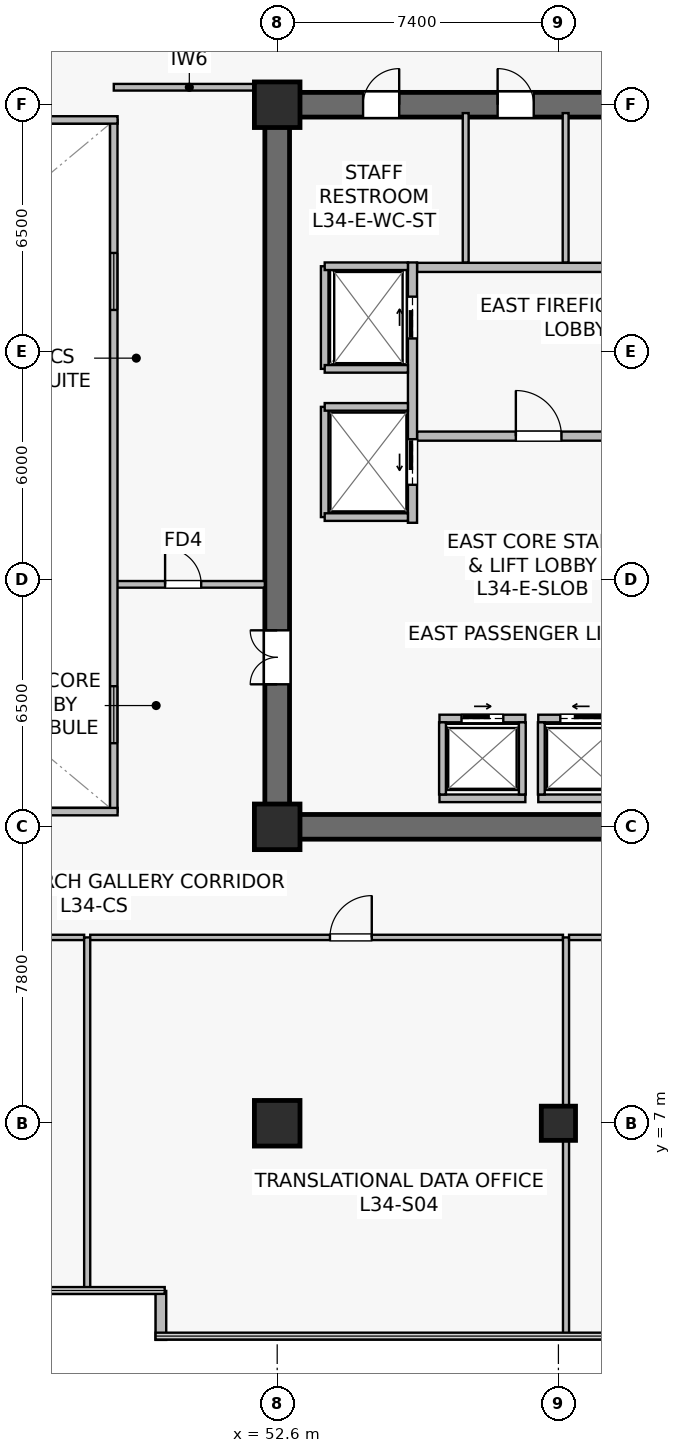
"""IFC4 building model, lengths in metres.
Left out: names, types, materials, properties, quantities, classifications, styles, units other than length and angle.
Written with IfcOpenShell. Run it as: python <this file> out.ifc"""

import sys

from ifc_helpers import new_model, si_unit, direction, frame, frame_2d, origin, origin_2d, place, context, subcontext, project, spatial, rectangle, extrude, source, transform, mapped, element, fill, save


model = new_model("IFC4")
c1 = context("Model", 3, precision=1e-05, world=origin(), true_north=direction((0.0, 1.0)))
c2 = subcontext(c1, "Body", "Model", "MODEL_VIEW")
j1 = project(units=[si_unit("LENGTHUNIT", "METRE"), si_unit("PLANEANGLEUNIT", "RADIAN")], contexts=[c1])
p1 = place(None, origin())
s1 = spatial("IfcSite", under=j1, at=p1, CompositionType="ELEMENT")
p2 = place(p1, origin())
s2 = spatial("IfcBuilding", under=s1, at=p2, CompositionType="ELEMENT")
p3 = place(p2, frame((0.0, 0.0, 142.0)))
s3 = spatial("IfcBuildingStorey", under=s2, at=p3, CompositionType="ELEMENT", Elevation=142.0)
p4 = place(p3, frame((52.275, 14.8, 0.0), z_axis=(0.0, 0.0, 1.0), x_axis=(1.0, 0.0, 0.0)))
e1 = element("IfcWall", 1, at=p4, inside=s3, PredefinedType="SHEAR", context=c2, shape_type="SweptSolid", body=[
    extrude(rectangle(XDim=15.45, YDim=0.65, at=frame_2d((7.725, 0.0))), origin(), (0.0, 0.0, 1.0), 3.79),
])
p5 = place(p3, frame((52.275, 33.8, 0.0), z_axis=(0.0, 0.0, 1.0), x_axis=(1.0, 0.0, 0.0)))
e2 = element("IfcWall", 2, at=p5, inside=s3, PredefinedType="SHEAR", context=c2, shape_type="SweptSolid", body=[
    extrude(rectangle(XDim=15.45, YDim=0.65, at=frame_2d((7.725, 0.0))), origin(), (0.0, 0.0, 1.0), 3.79),
])
p6 = place(p5, frame((6.125, 0.0, 0.0)))
e3 = element("IfcOpeningElement", 3, at=p6, cuts=e2, PredefinedType="OPENING", context=c2, shape_type="SweptSolid", body=[
    extrude(rectangle(XDim=0.95, YDim=2.15, at=frame_2d((0.475, 1.075))), frame((0.0, 0.335, 0.0), z_axis=(0.0, -1.0, 0.0), x_axis=(1.0, 0.0, 0.0)), (0.0, 0.0, 1.0), 0.67),
])
p7 = place(p5, frame((2.585, 0.0, 0.0)))
e4 = element("IfcOpeningElement", 4, at=p7, cuts=e2, PredefinedType="OPENING", context=c2, shape_type="SweptSolid", body=[
    extrude(rectangle(XDim=0.95, YDim=2.15, at=frame_2d((0.475, 1.075))), frame((0.0, 0.335, 0.0), z_axis=(0.0, -1.0, 0.0), x_axis=(1.0, 0.0, 0.0)), (0.0, 0.0, 1.0), 0.67),
])
p8 = place(p3, frame((52.6, 15.125, 0.0), z_axis=(0.0, 0.0, 1.0), x_axis=(0.0, 1.0, 0.0)))
e5 = element("IfcWall", 5, at=p8, inside=s3, PredefinedType="SHEAR", context=c2, shape_type="SweptSolid", body=[
    extrude(rectangle(XDim=18.35, YDim=0.65, at=frame_2d((9.175, 0.0))), origin(), (0.0, 0.0, 1.0), 3.79),
])
p9 = place(p8, frame((3.425, 0.0, 0.0)))
e6 = element("IfcOpeningElement", 6, at=p9, cuts=e5, PredefinedType="OPENING", context=c2, shape_type="SweptSolid", body=[
    extrude(rectangle(XDim=1.42, YDim=2.2, at=frame_2d((0.71, 1.1))), frame((0.0, 0.335, 0.0), z_axis=(0.0, -1.0, 0.0), x_axis=(1.0, 0.0, 0.0)), (0.0, 0.0, 1.0), 0.67),
])
m1 = source(origin(), c2, "Body", "SweptSolid", [
    extrude(rectangle(XDim=1.2, YDim=1.2, at=origin_2d()), origin(), (0.0, 0.0, 1.0), 4.1),
])
p10 = place(p3, frame((52.6, 7.0, 0.0), z_axis=(0.0, 0.0, 1.0), x_axis=(1.0, 0.0, 0.0)))
e7 = element("IfcColumn", 7, at=p10, inside=s3, PredefinedType="COLUMN", context=c2, shape_type="MappedRepresentation", body=[
    mapped(m1, transform((0.0, 0.0, 0.0), scale=1.0)),
])
m2 = source(origin(), c2, "Body", "SweptSolid", [
    extrude(rectangle(XDim=0.9, YDim=0.9, at=origin_2d()), origin(), (0.0, 0.0, 1.0), 4.1),
])
p11 = place(p3, frame((60.0, 7.0, 0.0), z_axis=(0.0, 0.0, 1.0), x_axis=(1.0, 0.0, 0.0)))
e8 = element("IfcColumn", 8, at=p11, inside=s3, PredefinedType="COLUMN", context=c2, shape_type="MappedRepresentation", body=[
    mapped(m2, transform((0.0, 0.0, 0.0), scale=1.0)),
])
for number, where, z_axis, x_axis in (
    (9, (52.6, 14.8, 0.0), (0.0, 0.0, 1.0), (1.0, 0.0, 0.0)),
    (10, (52.6, 33.8, 0.0), (0.0, 0.0, 1.0), (1.0, 0.0, 0.0)),
):
    element("IfcColumn", number, at=place(p3, frame(where, z_axis=z_axis, x_axis=x_axis)), inside=s3, PredefinedType="COLUMN", context=c2, shape_type="MappedRepresentation", body=[
        mapped(m1, transform((0.0, 0.0, 0.0), scale=1.0)),
    ])
p12 = place(p3, frame((49.54, 2.588, 0.0), z_axis=(0.0, 0.0, 1.0), x_axis=(0.0, -1.0, 0.0)))
e11 = element("IfcWall", 11, at=p12, inside=s3, PredefinedType="STANDARD", context=c2, shape_type="SweptSolid", body=[
    extrude(rectangle(XDim=1.288, YDim=0.28, at=frame_2d((0.644, 0.0))), origin(), (0.0, 0.0, 1.0), 3.79),
])
p13 = place(p3, frame((56.28, 25.08, 0.0), z_axis=(0.0, 0.0, 1.0), x_axis=(1.0, 0.0, 0.0)))
e12 = element("IfcWall", 12, at=p13, inside=s3, PredefinedType="SOLIDWALL", context=c2, shape_type="SweptSolid", body=[
    extrude(rectangle(XDim=6.92, YDim=0.24, at=frame_2d((3.46, 0.0))), origin(), (0.0, 0.0, 1.0), 3.125),
])
p14 = place(p13, frame((2.6, 0.0, 0.0)))
e13 = element("IfcOpeningElement", 13, at=p14, cuts=e12, PredefinedType="OPENING", context=c2, shape_type="SweptSolid", body=[
    extrude(rectangle(XDim=1.2, YDim=2.16, at=frame_2d((0.6, 1.08))), frame((0.0, 0.13, 0.0), z_axis=(0.0, -1.0, 0.0), x_axis=(1.0, 0.0, 0.0)), (0.0, 0.0, 1.0), 0.26),
])
p15 = place(p3, frame((56.28, 29.52, 0.0), z_axis=(0.0, 0.0, 1.0), x_axis=(1.0, 0.0, 0.0)))
e14 = element("IfcWall", 14, at=p15, inside=s3, PredefinedType="SOLIDWALL", context=c2, shape_type="SweptSolid", body=[
    extrude(rectangle(XDim=6.92, YDim=0.24, at=frame_2d((3.46, 0.0))), origin(), (0.0, 0.0, 1.0), 3.125),
])
p16 = place(p3, frame((56.16, 22.8, 0.0), z_axis=(0.0, 0.0, 1.0), x_axis=(0.0, 1.0, 0.0)))
e15 = element("IfcWall", 15, at=p16, inside=s3, PredefinedType="SOLIDWALL", context=c2, shape_type="SweptSolid", body=[
    extrude(rectangle(XDim=6.85, YDim=0.24, at=frame_2d((3.425, 0.0))), origin(), (0.0, 0.0, 1.0), 2.875),
])
p17 = place(p16, frame((4.85, 0.0, 0.0)))
e16 = element("IfcOpeningElement", 16, at=p17, cuts=e15, PredefinedType="OPENING", context=c2, shape_type="SweptSolid", body=[
    extrude(rectangle(XDim=1.1, YDim=2.22, at=frame_2d((0.55, 1.11))), frame((0.0, 0.13, 0.0), z_axis=(0.0, -1.0, 0.0), x_axis=(1.0, 0.0, 0.0)), (0.0, 0.0, 1.0), 0.26),
])
p18 = place(p16, frame((1.0, 0.0, 0.0)))
e17 = element("IfcOpeningElement", 17, at=p18, cuts=e15, PredefinedType="OPENING", context=c2, shape_type="SweptSolid", body=[
    extrude(rectangle(XDim=1.2, YDim=2.22, at=frame_2d((0.6, 1.11))), frame((0.0, 0.13, 0.0), z_axis=(0.0, -1.0, 0.0), x_axis=(1.0, 0.0, 0.0)), (0.0, 0.0, 1.0), 0.26),
])
p19 = place(p3, frame((59.47, 17.65, 0.0), z_axis=(0.0, 0.0, 1.0), x_axis=(1.0, 0.0, 0.0)))
e18 = element("IfcWall", 18, at=p19, inside=s3, PredefinedType="SOLIDWALL", context=c2, shape_type="SweptSolid", body=[
    extrude(rectangle(XDim=2.26, YDim=0.2, at=frame_2d((1.13, 0.0))), origin(), (0.0, 0.0, 1.0), 3.125),
])
p20 = place(p19, frame((0.58, 0.0, 0.0)))
e19 = element("IfcOpeningElement", 19, at=p20, cuts=e18, PredefinedType="OPENING", context=c2, shape_type="SweptSolid", body=[
    extrude(rectangle(XDim=1.1, YDim=2.22, at=frame_2d((0.55, 1.11))), frame((0.0, 0.11, 0.0), z_axis=(0.0, -1.0, 0.0), x_axis=(1.0, 0.0, 0.0)), (0.0, 0.0, 1.0), 0.22),
])
p21 = place(p3, frame((59.47, 15.55, 0.0), z_axis=(0.0, 0.0, 1.0), x_axis=(1.0, 0.0, 0.0)))
e20 = element("IfcWall", 20, at=p21, inside=s3, PredefinedType="SOLIDWALL", context=c2, shape_type="SweptSolid", body=[
    extrude(rectangle(XDim=2.26, YDim=0.2, at=frame_2d((1.13, 0.0))), origin(), (0.0, 0.0, 1.0), 3.125),
])
p22 = place(p3, frame((59.55, 15.65, 0.0), z_axis=(0.0, 0.0, 1.0), x_axis=(0.0, 1.0, 0.0)))
e21 = element("IfcWall", 21, at=p22, inside=s3, PredefinedType="SOLIDWALL", context=c2, shape_type="SweptSolid", body=[
    extrude(rectangle(XDim=1.9, YDim=0.18, at=frame_2d((0.95, 0.0))), origin(), (0.0, 0.0, 1.0), 3.79),
])
p23 = place(p3, frame((56.87, 17.65, 0.0), z_axis=(0.0, 0.0, 1.0), x_axis=(1.0, 0.0, 0.0)))
e22 = element("IfcWall", 22, at=p23, inside=s3, PredefinedType="SOLIDWALL", context=c2, shape_type="SweptSolid", body=[
    extrude(rectangle(XDim=2.26, YDim=0.2, at=frame_2d((1.13, 0.0))), origin(), (0.0, 0.0, 1.0), 3.79),
])
p24 = place(p23, frame((0.58, 0.0, 0.0)))
e23 = element("IfcOpeningElement", 23, at=p24, cuts=e22, PredefinedType="OPENING", context=c2, shape_type="SweptSolid", body=[
    extrude(rectangle(XDim=1.1, YDim=2.22, at=frame_2d((0.55, 1.11))), frame((0.0, 0.11, 0.0), z_axis=(0.0, -1.0, 0.0), x_axis=(1.0, 0.0, 0.0)), (0.0, 0.0, 1.0), 0.22),
])
p25 = place(p3, frame((56.87, 15.55, 0.0), z_axis=(0.0, 0.0, 1.0), x_axis=(1.0, 0.0, 0.0)))
e24 = element("IfcWall", 24, at=p25, inside=s3, PredefinedType="SOLIDWALL", context=c2, shape_type="SweptSolid", body=[
    extrude(rectangle(XDim=2.26, YDim=0.2, at=frame_2d((1.13, 0.0))), origin(), (0.0, 0.0, 1.0), 3.79),
])
for number, where, z_axis, x_axis in (
    (25, (56.95, 15.65, 0.0), (0.0, 0.0, 1.0), (0.0, 1.0, 0.0)),
    (26, (59.05, 15.65, 0.0), (0.0, 0.0, 1.0), (0.0, 1.0, 0.0)),
):
    element("IfcWall", number, at=place(p3, frame(where, z_axis=z_axis, x_axis=x_axis)), inside=s3, PredefinedType="SOLIDWALL", context=c2, shape_type="SweptSolid", body=[
        extrude(rectangle(XDim=1.9, YDim=0.18, at=frame_2d((0.95, 0.0))), origin(), (0.0, 0.0, 1.0), 3.79),
    ])
p26 = place(p3, frame((53.85, 26.85, 0.0), z_axis=(0.0, 0.0, 1.0), x_axis=(0.0, 1.0, 0.0)))
e27 = element("IfcWall", 27, at=p26, inside=s3, PredefinedType="SOLIDWALL", context=c2, shape_type="SweptSolid", body=[
    extrude(rectangle(XDim=2.7, YDim=0.2, at=frame_2d((1.35, 0.0))), origin(), (0.0, 0.0, 1.0), 3.79),
])
p27 = place(p3, frame((53.85, 29.55, 0.0), z_axis=(0.0, 0.0, 1.0), x_axis=(1.0, 0.0, 0.0)))
e28 = element("IfcWall", 28, at=p27, inside=s3, PredefinedType="SOLIDWALL", context=c2, shape_type="SweptSolid", body=[
    extrude(rectangle(XDim=2.19, YDim=0.2, at=frame_2d((1.095, 0.0))), origin(), (0.0, 0.0, 1.0), 3.79),
])
p28 = place(p3, frame((53.85, 26.85, 0.0), z_axis=(0.0, 0.0, 1.0), x_axis=(1.0, 0.0, 0.0)))
e29 = element("IfcWall", 29, at=p28, inside=s3, PredefinedType="SOLIDWALL", context=c2, shape_type="SweptSolid", body=[
    extrude(rectangle(XDim=2.19, YDim=0.2, at=frame_2d((1.095, 0.0))), origin(), (0.0, 0.0, 1.0), 3.187),
])
p29 = place(p3, frame((53.85, 22.95, 0.0), z_axis=(0.0, 0.0, 1.0), x_axis=(0.0, 1.0, 0.0)))
e30 = element("IfcWall", 30, at=p29, inside=s3, PredefinedType="SOLIDWALL", context=c2, shape_type="SweptSolid", body=[
    extrude(rectangle(XDim=2.9, YDim=0.2, at=frame_2d((1.45, 0.0))), origin(), (0.0, 0.0, 1.0), 2.875),
])
for number, where, z_axis, x_axis in (
    (31, (53.85, 25.85, 0.0), (0.0, 0.0, 1.0), (1.0, 0.0, 0.0)),
    (32, (53.85, 22.95, 0.0), (0.0, 0.0, 1.0), (1.0, 0.0, 0.0)),
):
    element("IfcWall", number, at=place(p3, frame(where, z_axis=z_axis, x_axis=x_axis)), inside=s3, PredefinedType="SOLIDWALL", context=c2, shape_type="SweptSolid", body=[
        extrude(rectangle(XDim=2.19, YDim=0.2, at=frame_2d((1.095, 0.0))), origin(), (0.0, 0.0, 1.0), 3.79),
    ])
p30 = place(p3, frame((60.19, 29.65, 0.0), z_axis=(0.0, 0.0, 1.0), x_axis=(0.0, 1.0, 0.0)))
e33 = element("IfcWall", 33, at=p30, inside=s3, PredefinedType="PLUMBINGWALL", context=c2, shape_type="SweptSolid", body=[
    extrude(rectangle(XDim=3.93, YDim=0.155, at=frame_2d((1.965, 0.0))), origin(), (0.0, 0.0, 1.0), 3.125),
])
p31 = place(p3, frame((57.56, 29.65, 0.0), z_axis=(0.0, 0.0, 1.0), x_axis=(0.0, 1.0, 0.0)))
e34 = element("IfcWall", 34, at=p31, inside=s3, PredefinedType="PLUMBINGWALL", context=c2, shape_type="SweptSolid", body=[
    extrude(rectangle(XDim=3.93, YDim=0.155, at=frame_2d((1.965, 0.0))), origin(), (0.0, 0.0, 1.0), 3.79),
])
p32 = place(p3, frame((48.3, 34.26, 0.0), z_axis=(0.0, 0.0, 1.0), x_axis=(1.0, 0.0, 0.0)))
e35 = element("IfcWall", 35, at=p32, inside=s3, PredefinedType="PARTITIONING", context=c2, shape_type="SweptSolid", body=[
    extrude(rectangle(XDim=3.975, YDim=0.175, at=frame_2d((1.987, 0.0))), origin(), (0.0, 0.0, 1.0), 3.475),
])
p33 = place(p3, frame((48.3, 21.18, 0.0), z_axis=(0.0, 0.0, 1.0), x_axis=(1.0, 0.0, 0.0)))
e36 = element("IfcWall", 36, at=p33, inside=s3, PredefinedType="PARTITIONING", context=c2, shape_type="SweptSolid", body=[
    extrude(rectangle(XDim=3.975, YDim=0.175, at=frame_2d((1.987, 0.0))), origin(), (0.0, 0.0, 1.0), 3.79),
])
p34 = place(p33, frame((1.35, 0.0, 0.0)))
e37 = element("IfcOpeningElement", 37, at=p34, cuts=e36, PredefinedType="OPENING", context=c2, shape_type="SweptSolid", body=[
    extrude(rectangle(XDim=0.95, YDim=2.15, at=frame_2d((0.475, 1.075))), frame((0.0, 0.098, 0.0), z_axis=(0.0, -1.0, 0.0), x_axis=(1.0, 0.0, 0.0)), (0.0, 0.0, 1.0), 0.195),
])
p35 = place(p3, frame((48.3, 15.2, 0.0), z_axis=(0.0, 0.0, 1.0), x_axis=(0.0, 1.0, 0.0)))
e38 = element("IfcWall", 38, at=p35, inside=s3, PredefinedType="SOLIDWALL", context=c2, shape_type="SweptSolid", body=[
    extrude(rectangle(XDim=18.2, YDim=0.195, at=frame_2d((9.1, 0.0))), origin(), (0.0, 0.0, 1.0), 3.79),
])
p36 = place(p35, frame((1.8, 0.0, 0.9)))
e39 = element("IfcOpeningElement", 39, at=p36, cuts=e38, PredefinedType="OPENING", context=c2, shape_type="SweptSolid", body=[
    extrude(rectangle(XDim=1.5, YDim=1.4, at=frame_2d((0.75, 0.7))), frame((0.0, 0.107, 0.0), z_axis=(0.0, -1.0, 0.0), x_axis=(1.0, 0.0, 0.0)), (0.0, 0.0, 1.0), 0.215),
])
p37 = place(p35, frame((13.2, 0.0, 0.9)))
e40 = element("IfcOpeningElement", 40, at=p37, cuts=e38, PredefinedType="OPENING", context=c2, shape_type="SweptSolid", body=[
    extrude(rectangle(XDim=1.5, YDim=1.4, at=frame_2d((0.75, 0.7))), frame((0.0, 0.107, 0.0), z_axis=(0.0, -1.0, 0.0), x_axis=(1.0, 0.0, 0.0)), (0.0, 0.0, 1.0), 0.215),
])
for number, where, z_axis, x_axis in (
    (41, (26.4, 15.2, 0.0), (0.0, 0.0, 1.0), (1.0, 0.0, 0.0)),
    (42, (26.4, 33.4, 0.0), (0.0, 0.0, 1.0), (1.0, 0.0, 0.0)),
):
    element("IfcWall", number, at=place(p3, frame(where, z_axis=z_axis, x_axis=x_axis)), inside=s3, PredefinedType="SOLIDWALL", context=c2, shape_type="SweptSolid", body=[
        extrude(rectangle(XDim=22.0, YDim=0.195, at=frame_2d((11.0, 0.0))), origin(), (0.0, 0.0, 1.0), 3.79),
    ])
p38 = place(p3, frame((32.48, 11.89, 0.0), z_axis=(0.0, 0.0, 1.0), x_axis=(1.0, 0.0, 0.0)))
e43 = element("IfcWall", 43, at=p38, inside=s3, PredefinedType="PARTITIONING", context=c2, shape_type="SweptSolid", body=[
    extrude(rectangle(XDim=15.04, YDim=0.14, at=frame_2d((7.52, 0.0))), origin(), (0.0, 0.0, 1.0), 3.125),
])
p39 = place(p38, frame((6.176, 0.0, 0.0)))
e44 = element("IfcOpeningElement", 44, at=p39, cuts=e43, PredefinedType="OPENING", context=c2, shape_type="SweptSolid", body=[
    extrude(rectangle(XDim=1.1, YDim=2.18, at=frame_2d((0.55, 1.09))), frame((0.0, 0.08, 0.0), z_axis=(0.0, -1.0, 0.0), x_axis=(1.0, 0.0, 0.0)), (0.0, 0.0, 1.0), 0.16),
])
p40 = place(p3, frame((47.6, 2.61, 0.0), z_axis=(0.0, 0.0, 1.0), x_axis=(0.0, 1.0, 0.0)))
e45 = element("IfcWall", 45, at=p40, inside=s3, PredefinedType="PARTITIONING", context=c2, shape_type="SweptSolid", body=[
    extrude(rectangle(XDim=9.28, YDim=0.16, at=frame_2d((4.64, 0.0))), origin(), (0.0, 0.0, 1.0), 3.075),
])
p41 = place(p3, frame((47.68, 11.89, 0.0), z_axis=(0.0, 0.0, 1.0), x_axis=(1.0, 0.0, 0.0)))
e46 = element("IfcWall", 46, at=p41, inside=s3, PredefinedType="PARTITIONING", context=c2, shape_type="SweptSolid", body=[
    extrude(rectangle(XDim=12.44, YDim=0.14, at=frame_2d((6.22, 0.0))), origin(), (0.0, 0.0, 1.0), 3.125),
])
p42 = place(p41, frame((6.308, 0.0, 0.0)))
e47 = element("IfcOpeningElement", 47, at=p42, cuts=e46, PredefinedType="OPENING", context=c2, shape_type="SweptSolid", body=[
    extrude(rectangle(XDim=1.1, YDim=2.18, at=frame_2d((0.55, 1.09))), frame((0.0, 0.08, 0.0), z_axis=(0.0, -1.0, 0.0), x_axis=(1.0, 0.0, 0.0)), (0.0, 0.0, 1.0), 0.16),
])
p43 = place(p3, frame((60.2, 1.41, 0.0), z_axis=(0.0, 0.0, 1.0), x_axis=(0.0, 1.0, 0.0)))
e48 = element("IfcWall", 48, at=p43, inside=s3, PredefinedType="PARTITIONING", context=c2, shape_type="SweptSolid", body=[
    extrude(rectangle(XDim=10.48, YDim=0.16, at=frame_2d((5.24, 0.0))), origin(), (0.0, 0.0, 1.0), 3.075),
])
p44 = place(p3, frame((60.28, 11.89, 0.0), z_axis=(0.0, 0.0, 1.0), x_axis=(1.0, 0.0, 0.0)))
e49 = element("IfcWall", 49, at=p44, inside=s3, PredefinedType="PARTITIONING", context=c2, shape_type="SweptSolid", body=[
    extrude(rectangle(XDim=7.54, YDim=0.14, at=frame_2d((3.77, 0.0))), origin(), (0.0, 0.0, 1.0), 3.275),
])
p45 = place(p44, frame((2.92, 0.0, 0.0)))
e50 = element("IfcOpeningElement", 50, at=p45, cuts=e49, PredefinedType="OPENING", context=c2, shape_type="SweptSolid", body=[
    extrude(rectangle(XDim=1.0, YDim=2.15, at=frame_2d((0.5, 1.075))), frame((0.0, 0.08, 0.0), z_axis=(0.0, -1.0, 0.0), x_axis=(1.0, 0.0, 0.0)), (0.0, 0.0, 1.0), 0.16),
])
m3 = source(origin(), c2, "Body", "SweptSolid", [
    extrude(rectangle(XDim=1.5, YDim=1.4, at=frame_2d((0.75, 0.7))), frame((0.0, 0.03, 0.0), z_axis=(0.0, -1.0, 0.0), x_axis=(1.0, 0.0, 0.0)), (0.0, 0.0, 1.0), 0.06),
])
p46 = place(p36, origin())
e51 = element("IfcWindow", 51, at=p46, inside=s3, PartitioningType="SINGLE_PANEL", PredefinedType="WINDOW", context=c2, shape_type="MappedRepresentation", body=[
    mapped(m3, transform((0.0, 0.0, 0.0), scale=1.0)),
])
fill(e39, e51)
p47 = place(p37, origin())
e52 = element("IfcWindow", 52, at=p47, inside=s3, PartitioningType="SINGLE_PANEL", PredefinedType="WINDOW", context=c2, shape_type="MappedRepresentation", body=[
    mapped(m3, transform((0.0, 0.0, 0.0), scale=1.0)),
])
fill(e40, e52)
m4 = source(origin(), c2, "Body", "SweptSolid", [
    extrude(rectangle(XDim=1.2, YDim=2.16, at=frame_2d((0.6, 1.08))), frame((0.0, 0.025, 0.0), z_axis=(0.0, -1.0, 0.0), x_axis=(1.0, 0.0, 0.0)), (0.0, 0.0, 1.0), 0.05),
])
p48 = place(p14, origin())
e53 = element("IfcDoor", 53, at=p48, inside=s3, OperationType="SINGLE_SWING_LEFT", PredefinedType="DOOR", context=c2, shape_type="MappedRepresentation", body=[
    mapped(m4, transform((0.0, 0.0, 0.0), scale=1.0)),
])
fill(e13, e53)
m5 = source(origin(), c2, "Body", "SweptSolid", [
    extrude(rectangle(XDim=1.1, YDim=2.22, at=frame_2d((0.55, 1.11))), frame((0.0, 0.025, 0.0), z_axis=(0.0, -1.0, 0.0), x_axis=(1.0, 0.0, 0.0)), (0.0, 0.0, 1.0), 0.05),
])
p49 = place(p20, origin())
e54 = element("IfcDoor", 54, at=p49, inside=s3, OperationType="SLIDING_TO_LEFT", PredefinedType="USERDEFINED", context=c2, shape_type="MappedRepresentation", body=[
    mapped(m5, transform((0.0, 0.0, 0.0), scale=1.0)),
])
fill(e19, e54)
p50 = place(p24, origin())
e55 = element("IfcDoor", 55, at=p50, inside=s3, OperationType="SLIDING_TO_RIGHT", PredefinedType="USERDEFINED", context=c2, shape_type="MappedRepresentation", body=[
    mapped(m5, transform((0.0, 0.0, 0.0), scale=1.0)),
])
fill(e23, e55)
p51 = place(p17, origin())
e56 = element("IfcDoor", 56, at=p51, inside=s3, OperationType="SLIDING_TO_RIGHT", PredefinedType="USERDEFINED", context=c2, shape_type="MappedRepresentation", body=[
    mapped(m5, transform((0.0, 0.0, 0.0), scale=1.0)),
])
fill(e16, e56)
m6 = source(origin(), c2, "Body", "SweptSolid", [
    extrude(rectangle(XDim=1.2, YDim=2.22, at=frame_2d((0.6, 1.11))), frame((0.0, 0.025, 0.0), z_axis=(0.0, -1.0, 0.0), x_axis=(1.0, 0.0, 0.0)), (0.0, 0.0, 1.0), 0.05),
])
p52 = place(p18, origin())
e57 = element("IfcDoor", 57, at=p52, inside=s3, OperationType="SLIDING_TO_LEFT", PredefinedType="USERDEFINED", context=c2, shape_type="MappedRepresentation", body=[
    mapped(m6, transform((0.0, 0.0, 0.0), scale=1.0)),
])
fill(e17, e57)
m7 = source(origin(), c2, "Body", "SweptSolid", [
    extrude(rectangle(XDim=1.42, YDim=2.2, at=frame_2d((0.71, 1.1))), frame((0.0, 0.025, 0.0), z_axis=(0.0, -1.0, 0.0), x_axis=(1.0, 0.0, 0.0)), (0.0, 0.0, 1.0), 0.05),
])
p53 = place(p9, origin())
e58 = element("IfcDoor", 58, at=p53, inside=s3, OperationType="DOUBLE_DOOR_SINGLE_SWING", PredefinedType="DOOR", context=c2, shape_type="MappedRepresentation", body=[
    mapped(m7, transform((0.0, 0.0, 0.0), scale=1.0)),
])
fill(e6, e58)
m8 = source(origin(), c2, "Body", "SweptSolid", [
    extrude(rectangle(XDim=0.95, YDim=2.15, at=frame_2d((0.475, 1.075))), frame((0.0, 0.025, 0.0), z_axis=(0.0, -1.0, 0.0), x_axis=(1.0, 0.0, 0.0)), (0.0, 0.0, 1.0), 0.05),
])
p54 = place(p6, origin())
e59 = element("IfcDoor", 59, at=p54, inside=s3, OperationType="SINGLE_SWING_LEFT", PredefinedType="DOOR", context=c2, shape_type="MappedRepresentation", body=[
    mapped(m8, transform((0.0, 0.0, 0.0), scale=1.0)),
])
fill(e3, e59)
p55 = place(p7, origin())
e60 = element("IfcDoor", 60, at=p55, inside=s3, OperationType="SINGLE_SWING_RIGHT", PredefinedType="DOOR", context=c2, shape_type="MappedRepresentation", body=[
    mapped(m8, transform((0.0, 0.0, 0.0), scale=1.0)),
])
fill(e4, e60)
p56 = place(p34, origin())
e61 = element("IfcDoor", 61, at=p56, inside=s3, OperationType="SINGLE_SWING_LEFT", PredefinedType="DOOR", context=c2, shape_type="MappedRepresentation", body=[
    mapped(m8, transform((0.0, 0.0, 0.0), scale=1.0)),
])
fill(e37, e61)
m9 = source(origin(), c2, "Body", "SweptSolid", [
    extrude(rectangle(XDim=1.1, YDim=2.18, at=frame_2d((0.55, 1.09))), frame((0.0, 0.025, 0.0), z_axis=(0.0, -1.0, 0.0), x_axis=(1.0, 0.0, 0.0)), (0.0, 0.0, 1.0), 0.05),
])
p57 = place(p42, origin())
e62 = element("IfcDoor", 62, at=p57, inside=s3, OperationType="SINGLE_SWING_RIGHT", PredefinedType="DOOR", context=c2, shape_type="MappedRepresentation", body=[
    mapped(m9, transform((0.0, 0.0, 0.0), scale=1.0)),
])
fill(e47, e62)
save(model, sys.argv[1])
